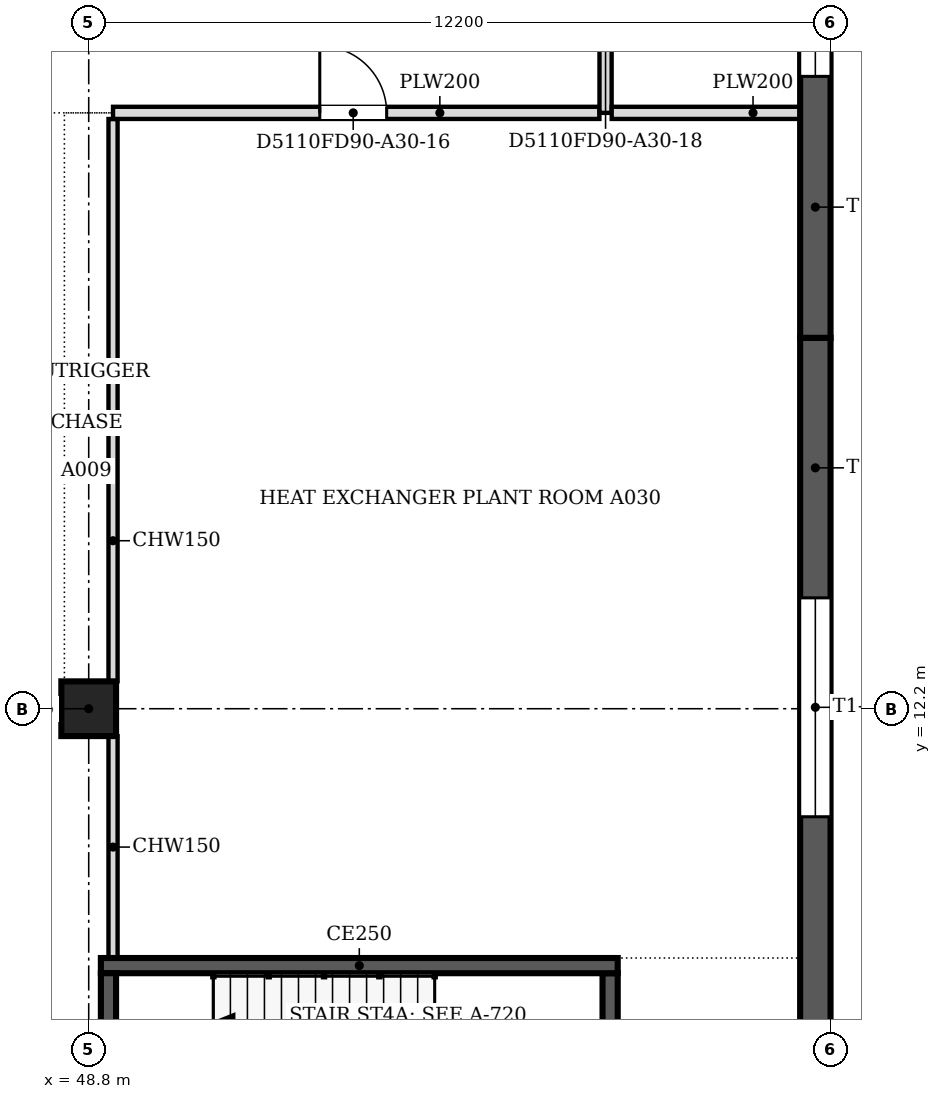
"""IFC4 building model, lengths in metres.
Left out: names, types, materials, properties, quantities, classifications, styles, units other than length and angle.
Written with IfcOpenShell. Run it as: python <this file> out.ifc"""

import sys

from ifc_helpers import new_model, si_unit, direction, frame, frame_2d, origin, origin_2d, place, context, subcontext, project, spatial, polyline, rectangle, outline, extrude, faceted_brep, source, transform, mapped, element, fill, save


model = new_model("IFC4")
c1 = context("Model", 3, precision=1e-05, world=origin(), true_north=direction((0.0, 1.0)))
c2 = subcontext(c1, "Body", "Model", "MODEL_VIEW")
j1 = project(units=[si_unit("LENGTHUNIT", "METRE"), si_unit("PLANEANGLEUNIT", "RADIAN")], contexts=[c1])
p1 = place(None, origin())
s1 = spatial("IfcSite", under=j1, at=p1, CompositionType="ELEMENT")
p2 = place(p1, origin())
s2 = spatial("IfcBuilding", under=s1, at=p2, CompositionType="ELEMENT")
p3 = place(p2, frame((0.0, 0.0, 63.8)))
s3 = spatial("IfcBuildingStorey", under=s2, at=p3, CompositionType="ELEMENT", Elevation=63.8)
p4 = place(p3, frame((48.8, 12.2, 0.0), z_axis=(0.0, 0.0, 1.0), x_axis=(1.0, 0.0, 0.0)))
e1 = element("IfcColumn", 1, at=p4, inside=s3, PredefinedType="COLUMN", context=c2, shape_type="SweptSolid", body=[
    extrude(rectangle(XDim=0.9, YDim=0.9, at=origin_2d()), origin(), (0.0, 0.0, 1.0), 4.6),
])
m1 = source(origin(), c2, "Body", "Brep", [
    faceted_brep([(0.0, -0.25, 0.0), (12.154, -0.25, 0.0), (12.154, -0.25, 4.8), (0.0, -0.25, 4.8), (0.047, 0.25, 4.8), (12.154, 0.25, 4.8), (12.154, 0.25, 0.0), (0.047, 0.25, 0.0), (0.0, 0.0, 0.0), (0.0, 0.0, 4.8)], [[[0, 1, 2, 3]], [[4, 5, 6, 7]], [[7, 6, 1, 0, 8]], [[5, 4, 9, 3, 2]], [[8, 0, 3, 9]], [[7, 8, 9, 4]], [[1, 6, 5, 2]]]),
])
p5 = place(p3, frame((60.75, 6.146, 0.0), z_axis=(0.0, 0.0, 1.0), x_axis=(0.0, 1.0, 0.0)))
e2 = element("IfcWall", 2, at=p5, inside=s3, PredefinedType="SOLIDWALL", context=c2, shape_type="MappedRepresentation", body=[
    mapped(m1, transform((0.0, 0.0, 0.0), scale=1.0)),
])
m2 = source(origin(), c2, "Body", "SweptSolid", [
    extrude(outline(polyline([(4.277, 0.8), (7.877, 0.8), (7.877, 4.0), (4.277, 4.0), (4.277, 0.8)])), frame((0.0, 0.26, 0.0), z_axis=(0.0, -1.0, 0.0), x_axis=(1.0, 0.0, 0.0)), (0.0, 0.0, 1.0), 0.52),
])
p6 = place(p5, origin())
e3 = element("IfcOpeningElement", 3, at=p6, cuts=e2, PredefinedType="OPENING", context=c2, shape_type="MappedRepresentation", body=[
    mapped(m2, transform((0.0, 0.0, 0.0), scale=1.0)),
])
m3 = source(origin(), c2, "Body", "SweptSolid", [
    extrude(outline(polyline([(0.0, 0.0), (12.2, 0.0), (12.2, 4.8), (0.0, 4.8), (0.0, 0.0)])), frame((0.0, 0.25, 0.0), z_axis=(0.0, -1.0, 0.0), x_axis=(1.0, 0.0, 0.0)), (0.0, 0.0, 1.0), 0.5),
])
p7 = place(p3, frame((60.75, 18.3, 0.0), z_axis=(0.0, 0.0, 1.0), x_axis=(0.0, 1.0, 0.0)))
e4 = element("IfcWall", 4, at=p7, inside=s3, PredefinedType="SOLIDWALL", context=c2, shape_type="MappedRepresentation", body=[
    mapped(m3, transform((0.0, 0.0, 0.0), scale=1.0)),
])
m4 = source(origin(), c2, "Body", "SweptSolid", [
    extrude(outline(polyline([(4.3, 0.8), (7.9, 0.8), (7.9, 4.0), (4.3, 4.0), (4.3, 0.8)])), frame((0.0, 0.26, 0.0), z_axis=(0.0, -1.0, 0.0), x_axis=(1.0, 0.0, 0.0)), (0.0, 0.0, 1.0), 0.52),
])
p8 = place(p7, origin())
e5 = element("IfcOpeningElement", 5, at=p8, cuts=e4, PredefinedType="OPENING", context=c2, shape_type="MappedRepresentation", body=[
    mapped(m4, transform((0.0, 0.0, 0.0), scale=1.0)),
])
p9 = place(p3, frame((49.125, 4.45, 0.0), z_axis=(0.0, 0.0, 1.0), x_axis=(0.0, 1.0, 0.0)))
e6 = element("IfcWall", 6, at=p9, inside=s3, PredefinedType="SOLIDWALL", context=c2, shape_type="SweptSolid", body=[
    extrude(rectangle(XDim=3.4, YDim=0.25, at=frame_2d((1.7, 0.0))), origin(), (0.0, 0.0, 1.0), 4.8),
])
p10 = place(p3, frame((49.0, 7.975, 0.0), z_axis=(0.0, 0.0, 1.0), x_axis=(1.0, 0.0, 0.0)))
e7 = element("IfcWall", 7, at=p10, inside=s3, PredefinedType="SOLIDWALL", context=c2, shape_type="SweptSolid", body=[
    extrude(rectangle(XDim=8.5, YDim=0.25, at=frame_2d((4.25, 0.0))), origin(), (0.0, 0.0, 1.0), 4.8),
])
p11 = place(p3, frame((57.375, 7.85, 0.0), z_axis=(0.0, 0.0, 1.0), x_axis=(0.0, -1.0, 0.0)))
e8 = element("IfcWall", 8, at=p11, inside=s3, PredefinedType="SOLIDWALL", context=c2, shape_type="SweptSolid", body=[
    extrude(rectangle(XDim=3.4, YDim=0.25, at=frame_2d((1.7, 0.0))), origin(), (0.0, 0.0, 1.0), 4.8),
])
p12 = place(p3, frame((49.2, 8.1, 0.0), z_axis=(0.0, 0.0, 1.0), x_axis=(0.0, 1.0, 0.0)))
e9 = element("IfcWall", 9, at=p12, inside=s3, PredefinedType="PARTITIONING", context=c2, shape_type="SweptSolid", body=[
    extrude(rectangle(XDim=3.649, YDim=0.15, at=frame_2d((1.824, 0.0))), origin(), (0.0, 0.0, 1.0), 4.067),
])
p13 = place(p3, frame((49.2, 12.651, 0.0), z_axis=(0.0, 0.0, 1.0), x_axis=(0.0, 1.0, 0.0)))
e10 = element("IfcWall", 10, at=p13, inside=s3, PredefinedType="PARTITIONING", context=c2, shape_type="SweptSolid", body=[
    extrude(rectangle(XDim=9.248, YDim=0.15, at=frame_2d((4.624, 0.0))), origin(), (0.0, 0.0, 1.0), 4.067),
])
p14 = place(p3, frame((57.199, 22.0, 0.0), z_axis=(0.0, 0.0, 1.0), x_axis=(-1.0, 0.0, 0.0)))
e11 = element("IfcWall", 11, at=p14, inside=s3, PredefinedType="PARTITIONING", context=c2, shape_type="SweptSolid", body=[
    extrude(rectangle(XDim=7.999, YDim=0.2, at=frame_2d((4.0, 0.0))), origin(), (0.0, 0.0, 1.0), 4.067),
])
m5 = source(origin(), c2, "Body", "SweptSolid", [
    extrude(rectangle(XDim=1.1, YDim=2.1, at=frame_2d((0.55, 1.05))), frame((0.0, 0.11, 0.0), z_axis=(0.0, -1.0, 0.0), x_axis=(1.0, 0.0, 0.0)), (0.0, 0.0, 1.0), 0.22),
])
p15 = place(p14, frame((3.499, 0.0, 0.0)))
e12 = element("IfcOpeningElement", 12, at=p15, cuts=e11, PredefinedType="OPENING", context=c2, shape_type="MappedRepresentation", body=[
    mapped(m5, transform((0.0, 0.0, 0.0), scale=1.0)),
])
p16 = place(p3, frame((57.3, 30.6, 0.0), z_axis=(0.0, 0.0, 1.0), x_axis=(0.0, -1.0, 0.0)))
e13 = element("IfcWall", 13, at=p16, inside=s3, PredefinedType="PARTITIONING", context=c2, shape_type="SweptSolid", body=[
    extrude(rectangle(XDim=8.6, YDim=0.2, at=frame_2d((4.3, 0.0))), origin(), (0.0, 0.0, 1.0), 4.067),
])
p17 = place(p16, frame((3.8, 0.0, 0.0)))
e14 = element("IfcOpeningElement", 14, at=p17, cuts=e13, PredefinedType="OPENING", context=c2, shape_type="MappedRepresentation", body=[
    mapped(m5, transform((0.0, 0.0, 0.0), scale=1.0)),
])
p18 = place(p3, frame((57.401, 22.0, 0.0), z_axis=(0.0, 0.0, 1.0), x_axis=(1.0, 0.0, 0.0)))
e15 = element("IfcWall", 15, at=p18, inside=s3, PredefinedType="PARTITIONING", context=c2, shape_type="SweptSolid", body=[
    extrude(rectangle(XDim=3.099, YDim=0.2, at=frame_2d((1.55, 0.0))), origin(), (0.0, 0.0, 1.0), 4.067),
])
m6 = source(origin(), c2, "Body", "SweptSolid", [
    extrude(outline(polyline([(4.277, 0.8), (7.877, 0.8), (7.877, 4.0), (4.277, 4.0), (4.277, 0.8)])), frame((0.0, 0.03, 0.0), z_axis=(0.0, -1.0, 0.0), x_axis=(1.0, 0.0, 0.0)), (0.0, 0.0, 1.0), 0.06),
])
p19 = place(p6, origin())
e16 = element("IfcWindow", 16, at=p19, inside=s3, PartitioningType="USERDEFINED", PredefinedType="WINDOW", context=c2, shape_type="MappedRepresentation", body=[
    mapped(m6, transform((0.0, 0.0, 0.0), scale=1.0)),
])
fill(e3, e16)
m7 = source(origin(), c2, "Body", "SweptSolid", [
    extrude(outline(polyline([(4.3, 0.8), (7.9, 0.8), (7.9, 4.0), (4.3, 4.0), (4.3, 0.8)])), frame((0.0, 0.03, 0.0), z_axis=(0.0, -1.0, 0.0), x_axis=(1.0, 0.0, 0.0)), (0.0, 0.0, 1.0), 0.06),
])
p20 = place(p8, origin())
e17 = element("IfcWindow", 17, at=p20, inside=s3, PartitioningType="USERDEFINED", PredefinedType="WINDOW", context=c2, shape_type="MappedRepresentation", body=[
    mapped(m7, transform((0.0, 0.0, 0.0), scale=1.0)),
])
fill(e5, e17)
m8 = source(origin(), c2, "Body", "SweptSolid", [
    extrude(rectangle(XDim=1.1, YDim=2.1, at=frame_2d((0.55, 1.05))), frame((0.0, 0.025, 0.0), z_axis=(0.0, -1.0, 0.0), x_axis=(1.0, 0.0, 0.0)), (0.0, 0.0, 1.0), 0.05),
])
p21 = place(p15, origin())
e18 = element("IfcDoor", 18, at=p21, inside=s3, OperationType="SINGLE_SWING_RIGHT", PredefinedType="DOOR", context=c2, shape_type="MappedRepresentation", body=[
    mapped(m8, transform((0.0, 0.0, 0.0), scale=1.0)),
])
fill(e12, e18)
save(model, sys.argv[1])
